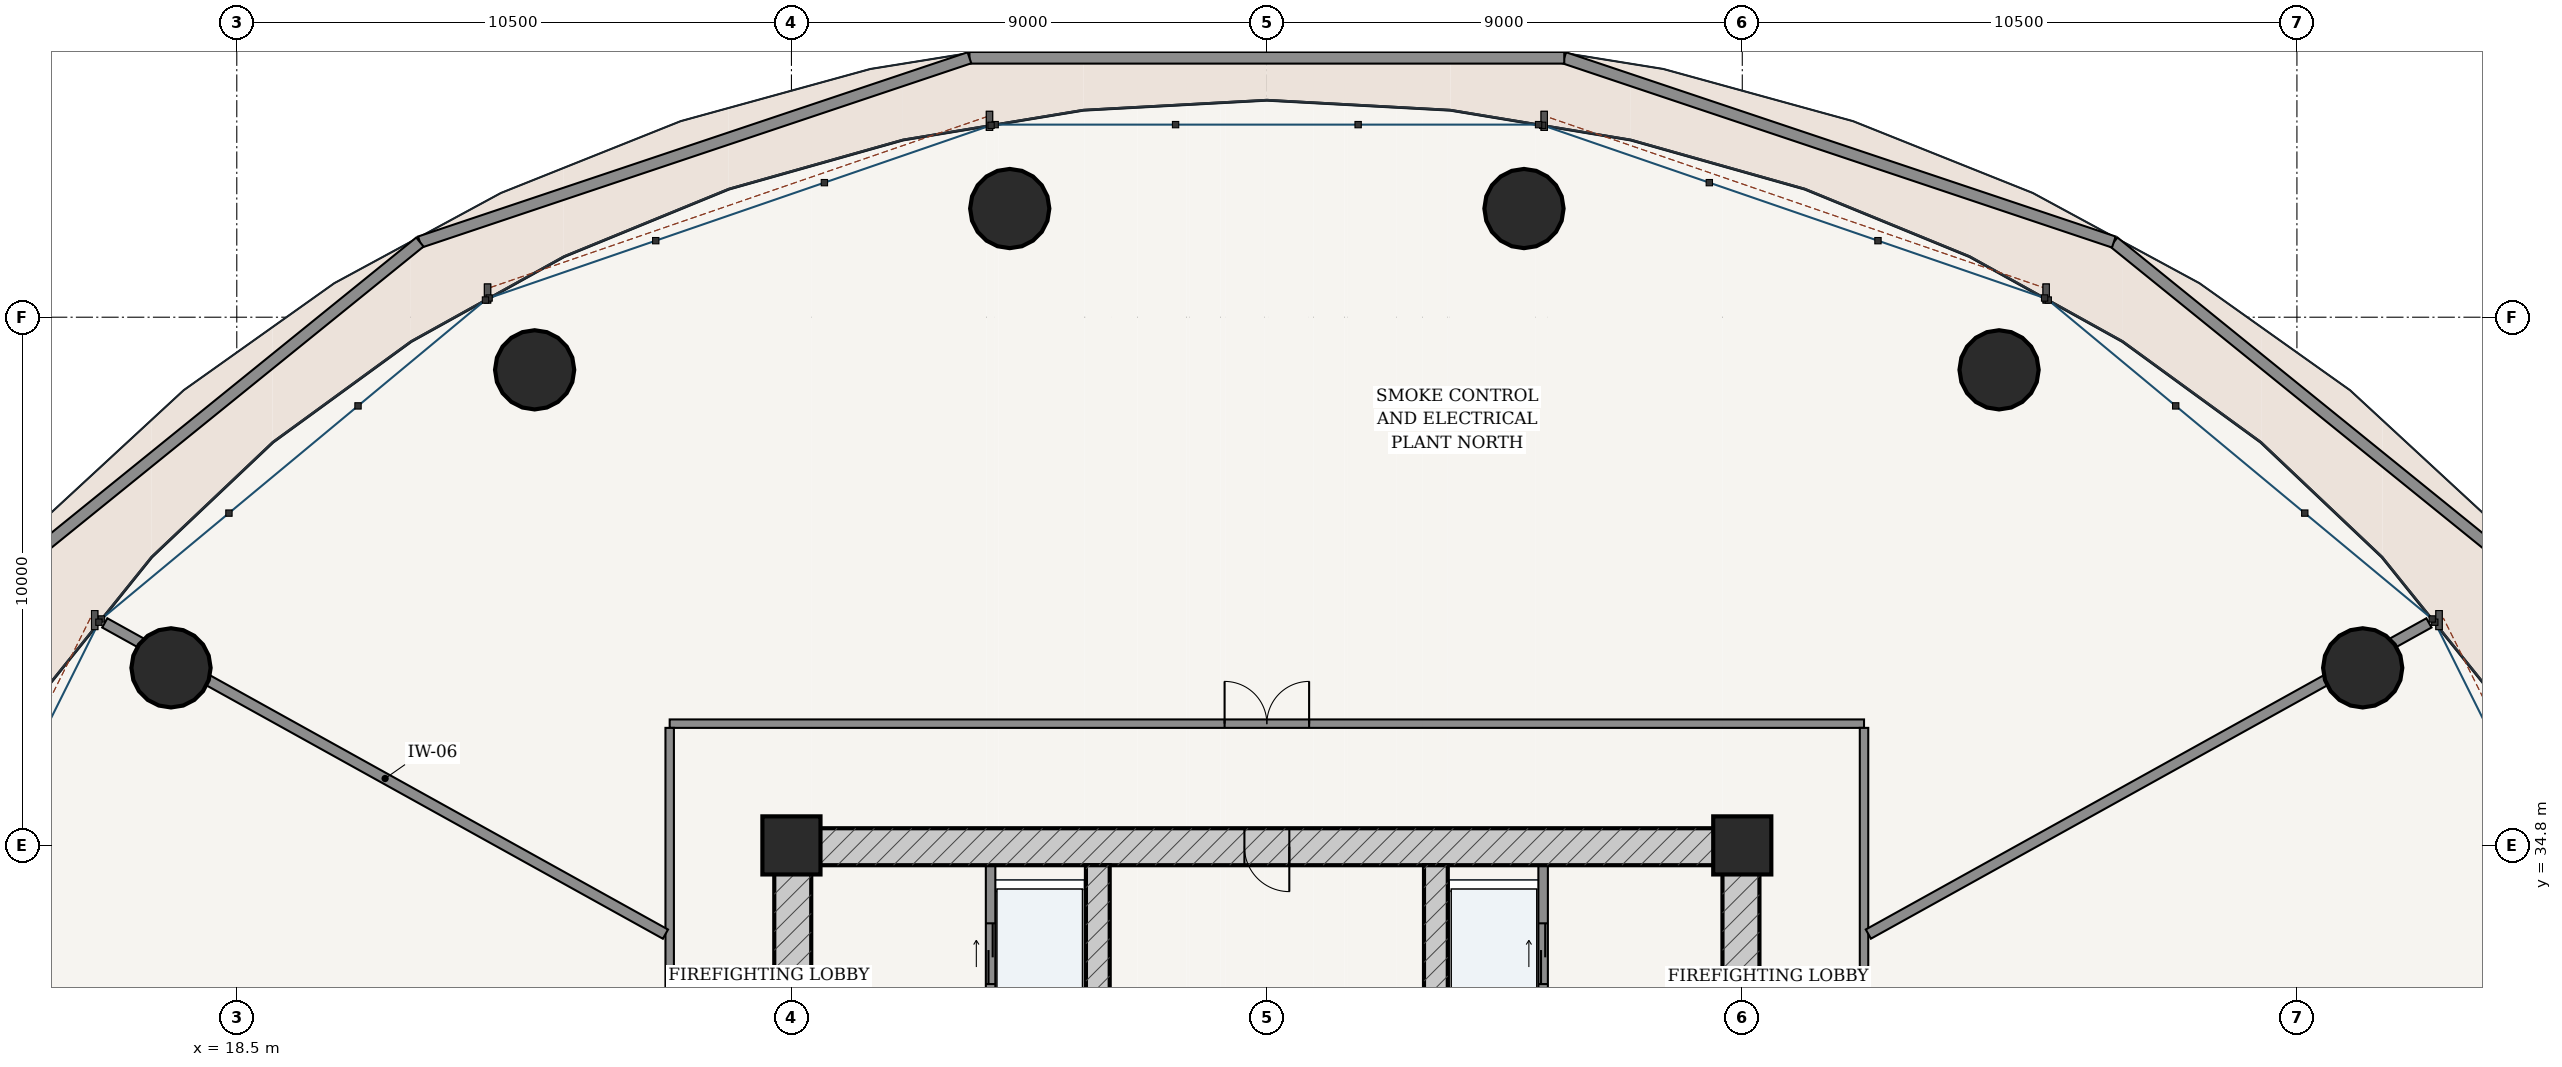
"""IFC4 building model, lengths in metres.
Left out: names, types, materials, properties, quantities, classifications, styles, units other than length and angle.
Written with IfcOpenShell. Run it as: python <this file> out.ifc"""

import sys

from ifc_helpers import new_model, si_unit, direction, frame, frame_2d, origin, origin_2d, place, context, subcontext, project, spatial, rectangle, hollow_circle, extrude, source, transform, mapped, element, fill, save


model = new_model("IFC4")
c1 = context("Model", 3, precision=1e-05, world=origin(), true_north=direction((-0.2419218956, 0.970295726276)))
c2 = subcontext(c1, "Body", "Model", "MODEL_VIEW")
j1 = project(units=[si_unit("LENGTHUNIT", "METRE"), si_unit("PLANEANGLEUNIT", "RADIAN")], contexts=[c1])
p1 = place(None, origin())
s1 = spatial("IfcSite", under=j1, at=p1, CompositionType="ELEMENT")
p2 = place(p1, origin())
s2 = spatial("IfcBuilding", under=s1, at=p2, CompositionType="ELEMENT")
p3 = place(p2, frame((0.0, 0.0, 74.4)))
s3 = spatial("IfcBuildingStorey", under=s2, at=p3, CompositionType="ELEMENT", Elevation=74.4)
for number, where, z_axis, x_axis in (
    (1, (47.0, 34.8, 0.0), (0.0, 0.0, 1.0), (1.0, 0.0, 0.0)),
    (2, (29.0, 34.8, 0.0), (0.0, 0.0, 1.0), (1.0, 0.0, 0.0)),
):
    element("IfcColumn", number, at=place(p3, frame(where, z_axis=z_axis, x_axis=x_axis)), inside=s3, PredefinedType="COLUMN", context=c2, shape_type="SweptSolid", body=[
        extrude(rectangle(XDim=1.1, YDim=1.1, at=origin_2d()), origin(), (0.0, 0.0, 1.0), 5.4),
    ])
p4 = place(p3, frame((28.675, 34.775, 0.0), z_axis=(0.0, 0.0, 1.0), x_axis=(1.0, 0.0, 0.0)))
e3 = element("IfcWall", 3, at=p4, inside=s3, PredefinedType="SHEAR", context=c2, shape_type="SweptSolid", body=[
    extrude(rectangle(XDim=18.65, YDim=0.7, at=frame_2d((9.325, 0.0))), origin(), (0.0, 0.0, 1.0), 5.125),
])
p5 = place(p4, frame((8.9, 0.0, 0.0)))
e4 = element("IfcOpeningElement", 4, at=p5, cuts=e3, PredefinedType="OPENING", context=c2, shape_type="SweptSolid", body=[
    extrude(rectangle(XDim=0.85, YDim=2.1, at=frame_2d((0.425, 1.05))), frame((0.0, 0.36, 0.0), z_axis=(0.0, -1.0, 0.0), x_axis=(1.0, 0.0, 0.0)), (0.0, 0.0, 1.0), 0.72),
])
p6 = place(p3, frame((29.025, 19.175, 0.0), z_axis=(0.0, 0.0, 1.0), x_axis=(0.0, 1.0, 0.0)))
e5 = element("IfcWall", 5, at=p6, inside=s3, PredefinedType="SHEAR", context=c2, shape_type="SweptSolid", body=[
    extrude(rectangle(XDim=15.25, YDim=0.7, at=frame_2d((7.625, 0.0))), origin(), (0.0, 0.0, 1.0), 5.125),
])
p7 = place(p6, frame((9.875, 0.0, 0.0)))
e6 = element("IfcOpeningElement", 6, at=p7, cuts=e5, PredefinedType="OPENING", context=c2, shape_type="SweptSolid", body=[
    extrude(rectangle(XDim=1.5, YDim=2.2, at=frame_2d((0.75, 1.1))), frame((0.0, 0.36, 0.0), z_axis=(0.0, -1.0, 0.0), x_axis=(1.0, 0.0, 0.0)), (0.0, 0.0, 1.0), 0.72),
])
p8 = place(p3, frame((46.975, 19.175, 0.0), z_axis=(0.0, 0.0, 1.0), x_axis=(0.0, 1.0, 0.0)))
e7 = element("IfcWall", 7, at=p8, inside=s3, PredefinedType="SHEAR", context=c2, shape_type="SweptSolid", body=[
    extrude(rectangle(XDim=15.25, YDim=0.7, at=frame_2d((7.625, 0.0))), origin(), (0.0, 0.0, 1.0), 5.125),
])
p9 = place(p8, frame((9.875, 0.0, 0.0)))
e8 = element("IfcOpeningElement", 8, at=p9, cuts=e7, PredefinedType="OPENING", context=c2, shape_type="SweptSolid", body=[
    extrude(rectangle(XDim=1.5, YDim=2.2, at=frame_2d((0.75, 1.1))), frame((0.0, 0.36, 0.0), z_axis=(0.0, -1.0, 0.0), x_axis=(1.0, 0.0, 0.0)), (0.0, 0.0, 1.0), 0.72),
])
p10 = place(p3, frame((34.8, 19.175, 0.0), z_axis=(0.0, 0.0, 1.0), x_axis=(0.0, 1.0, 0.0)))
e9 = element("IfcWall", 9, at=p10, inside=s3, PredefinedType="SHEAR", context=c2, shape_type="SweptSolid", body=[
    extrude(rectangle(XDim=15.25, YDim=0.45, at=frame_2d((7.625, 0.0))), origin(), (0.0, 0.0, 1.0), 5.125),
])
p11 = place(p10, frame((7.8, 0.0, 0.0)))
e10 = element("IfcOpeningElement", 10, at=p11, cuts=e9, PredefinedType="OPENING", context=c2, shape_type="SweptSolid", body=[
    extrude(rectangle(XDim=1.05, YDim=2.15, at=frame_2d((0.525, 1.075))), frame((0.0, 0.235, 0.0), z_axis=(0.0, -1.0, 0.0), x_axis=(1.0, 0.0, 0.0)), (0.0, 0.0, 1.0), 0.47),
])
p12 = place(p3, frame((41.2, 19.175, 0.0), z_axis=(0.0, 0.0, 1.0), x_axis=(0.0, 1.0, 0.0)))
e11 = element("IfcWall", 11, at=p12, inside=s3, PredefinedType="SHEAR", context=c2, shape_type="SweptSolid", body=[
    extrude(rectangle(XDim=15.25, YDim=0.45, at=frame_2d((7.625, 0.0))), origin(), (0.0, 0.0, 1.0), 5.125),
])
p13 = place(p12, frame((7.8, 0.0, 0.0)))
e12 = element("IfcOpeningElement", 12, at=p13, cuts=e11, PredefinedType="OPENING", context=c2, shape_type="SweptSolid", body=[
    extrude(rectangle(XDim=1.05, YDim=2.15, at=frame_2d((0.525, 1.075))), frame((0.0, 0.235, 0.0), z_axis=(0.0, -1.0, 0.0), x_axis=(1.0, 0.0, 0.0)), (0.0, 0.0, 1.0), 0.47),
])
for number, where, z_axis, x_axis in (
    (13, (58.745, 38.161, 0.0), (0.0, 0.0, 1.0), (1.0, 0.0, 0.0)),
    (14, (51.862, 43.803, 0.0), (0.0, 0.0, 1.0), (1.0, 0.0, 0.0)),
    (15, (42.867, 46.857, 0.0), (0.0, 0.0, 1.0), (1.0, 0.0, 0.0)),
    (16, (33.133, 46.857, 0.0), (0.0, 0.0, 1.0), (1.0, 0.0, 0.0)),
    (17, (24.138, 43.803, 0.0), (0.0, 0.0, 1.0), (1.0, 0.0, 0.0)),
    (18, (17.255, 38.161, 0.0), (0.0, 0.0, 1.0), (1.0, 0.0, 0.0)),
):
    element("IfcColumn", number, at=place(p3, frame(where, z_axis=z_axis, x_axis=x_axis)), inside=s3, PredefinedType="COLUMN", context=c2, shape_type="SweptSolid", body=[
        extrude(hollow_circle(Radius=0.75, WallThickness=0.045, at=origin_2d()), origin(), (0.0, 0.0, 1.0), 5.4),
    ])
p14 = place(p3, frame((61.996, 39.778, 0.0), z_axis=(0.0, 0.0, 1.0), x_axis=(-0.777277615045, 0.629157777628, 0.0)))
e19 = element("IfcWall", 19, at=p14, inside=s3, PredefinedType="PARAPET", context=c2, shape_type="SweptSolid", body=[
    extrude(rectangle(XDim=10.244, YDim=0.22, at=frame_2d((5.122, 0.0))), origin(), (0.0, 0.0, 1.0), 1.15),
])
p15 = place(p3, frame((54.034, 46.223, 0.0), z_axis=(0.0, 0.0, 1.0), x_axis=(-0.948127810737, 0.317889374636, 0.0)))
e20 = element("IfcWall", 20, at=p15, inside=s3, PredefinedType="PARAPET", context=c2, shape_type="SweptSolid", body=[
    extrude(rectangle(XDim=10.972, YDim=0.22, at=frame_2d((5.486, 0.0))), origin(), (0.0, 0.0, 1.0), 1.15),
])
p16 = place(p3, frame((43.63, 49.711, 0.0), z_axis=(0.0, 0.0, 1.0), x_axis=(-1.0, 0.0, 0.0)))
e21 = element("IfcWall", 21, at=p16, inside=s3, PredefinedType="PARAPET", context=c2, shape_type="SweptSolid", body=[
    extrude(rectangle(XDim=11.261, YDim=0.22, at=frame_2d((5.63, 0.0))), origin(), (0.0, 0.0, 1.0), 1.15),
])
p17 = place(p3, frame((32.37, 49.711, 0.0), z_axis=(0.0, 0.0, 1.0), x_axis=(-0.948127810737, -0.317889374636, 0.0)))
e22 = element("IfcWall", 22, at=p17, inside=s3, PredefinedType="PARAPET", context=c2, shape_type="SweptSolid", body=[
    extrude(rectangle(XDim=10.972, YDim=0.22, at=frame_2d((5.486, 0.0))), origin(), (0.0, 0.0, 1.0), 1.15),
])
p18 = place(p3, frame((21.966, 46.223, 0.0), z_axis=(0.0, 0.0, 1.0), x_axis=(-0.777277615045, -0.629157777628, 0.0)))
e23 = element("IfcWall", 23, at=p18, inside=s3, PredefinedType="PARAPET", context=c2, shape_type="SweptSolid", body=[
    extrude(rectangle(XDim=10.244, YDim=0.22, at=frame_2d((5.122, 0.0))), origin(), (0.0, 0.0, 1.0), 1.15),
])
p19 = place(p3, frame((32.77, 28.52, 0.0), z_axis=(0.0, 0.0, 1.0), x_axis=(0.0, 1.0, 0.0)))
e24 = element("IfcWall", 24, at=p19, inside=s3, PredefinedType="PARTITIONING", context=c2, shape_type="SweptSolid", body=[
    extrude(rectangle(XDim=5.905, YDim=0.18, at=frame_2d((2.953, 0.0))), origin(), (0.0, 0.0, 1.0), 5.125),
])
p20 = place(p19, frame((3.655, 0.0, 0.0)))
e25 = element("IfcOpeningElement", 25, at=p20, cuts=e24, PredefinedType="OPENING", context=c2, shape_type="SweptSolid", body=[
    extrude(rectangle(XDim=1.15, YDim=2.2, at=frame_2d((0.575, 1.1))), frame((0.0, 0.1, 0.0), z_axis=(0.0, -1.0, 0.0), x_axis=(1.0, 0.0, 0.0)), (0.0, 0.0, 1.0), 0.2),
])
p21 = place(p19, frame((0.73, 0.0, 0.0)))
e26 = element("IfcOpeningElement", 26, at=p21, cuts=e24, PredefinedType="OPENING", context=c2, shape_type="SweptSolid", body=[
    extrude(rectangle(XDim=1.2, YDim=2.25, at=frame_2d((0.6, 1.125))), frame((0.0, 0.1, 0.0), z_axis=(0.0, -1.0, 0.0), x_axis=(1.0, 0.0, 0.0)), (0.0, 0.0, 1.0), 0.2),
])
p22 = place(p3, frame((43.23, 28.52, 0.0), z_axis=(0.0, 0.0, 1.0), x_axis=(0.0, 1.0, 0.0)))
e27 = element("IfcWall", 27, at=p22, inside=s3, PredefinedType="PARTITIONING", context=c2, shape_type="SweptSolid", body=[
    extrude(rectangle(XDim=5.905, YDim=0.18, at=frame_2d((2.953, 0.0))), origin(), (0.0, 0.0, 1.0), 5.125),
])
p23 = place(p22, frame((0.905, 0.0, 0.0)))
e28 = element("IfcOpeningElement", 28, at=p23, cuts=e27, PredefinedType="OPENING", context=c2, shape_type="SweptSolid", body=[
    extrude(rectangle(XDim=0.85, YDim=2.1, at=frame_2d((0.425, 1.05))), frame((0.0, 0.1, 0.0), z_axis=(0.0, -1.0, 0.0), x_axis=(1.0, 0.0, 0.0)), (0.0, 0.0, 1.0), 0.2),
])
p24 = place(p22, frame((3.655, 0.0, 0.0)))
e29 = element("IfcOpeningElement", 29, at=p24, cuts=e27, PredefinedType="OPENING", context=c2, shape_type="SweptSolid", body=[
    extrude(rectangle(XDim=1.15, YDim=2.2, at=frame_2d((0.575, 1.1))), frame((0.0, 0.1, 0.0), z_axis=(0.0, -1.0, 0.0), x_axis=(1.0, 0.0, 0.0)), (0.0, 0.0, 1.0), 0.2),
])
p25 = place(p3, frame((26.695, 37.105, 0.0), z_axis=(0.0, 0.0, 1.0), x_axis=(1.0, 0.0, 0.0)))
e30 = element("IfcWall", 30, at=p25, inside=s3, PredefinedType="PARTITIONING", context=c2, shape_type="SweptSolid", body=[
    extrude(rectangle(XDim=22.61, YDim=0.16, at=frame_2d((11.305, 0.0))), origin(), (0.0, 0.0, 1.0), 4.567),
])
p26 = place(p25, frame((10.505, 0.0, 0.0)))
e31 = element("IfcOpeningElement", 31, at=p26, cuts=e30, PredefinedType="OPENING", context=c2, shape_type="SweptSolid", body=[
    extrude(rectangle(XDim=1.6, YDim=2.25, at=frame_2d((0.8, 1.125))), frame((0.0, 0.09, 0.0), z_axis=(0.0, -1.0, 0.0), x_axis=(1.0, 0.0, 0.0)), (0.0, 0.0, 1.0), 0.18),
])
p27 = place(p3, frame((26.695, 16.575, 0.0), z_axis=(0.0, 0.0, 1.0), x_axis=(0.0, 1.0, 0.0)))
e32 = element("IfcWall", 32, at=p27, inside=s3, PredefinedType="PARTITIONING", context=c2, shape_type="SweptSolid", body=[
    extrude(rectangle(XDim=20.45, YDim=0.16, at=frame_2d((10.225, 0.0))), origin(), (0.0, 0.0, 1.0), 4.567),
])
p28 = place(p27, frame((9.475, 0.0, 0.0)))
e33 = element("IfcOpeningElement", 33, at=p28, cuts=e32, PredefinedType="OPENING", context=c2, shape_type="SweptSolid", body=[
    extrude(rectangle(XDim=1.5, YDim=2.2, at=frame_2d((0.75, 1.1))), frame((0.0, 0.09, 0.0), z_axis=(0.0, -1.0, 0.0), x_axis=(1.0, 0.0, 0.0)), (0.0, 0.0, 1.0), 0.18),
])
p29 = place(p3, frame((49.305, 16.575, 0.0), z_axis=(0.0, 0.0, 1.0), x_axis=(0.0, 1.0, 0.0)))
e34 = element("IfcWall", 34, at=p29, inside=s3, PredefinedType="PARTITIONING", context=c2, shape_type="SweptSolid", body=[
    extrude(rectangle(XDim=20.45, YDim=0.16, at=frame_2d((10.225, 0.0))), origin(), (0.0, 0.0, 1.0), 4.567),
])
p30 = place(p29, frame((9.425, 0.0, 0.0)))
e35 = element("IfcOpeningElement", 35, at=p30, cuts=e34, PredefinedType="OPENING", context=c2, shape_type="SweptSolid", body=[
    extrude(rectangle(XDim=1.6, YDim=2.25, at=frame_2d((0.8, 1.125))), frame((0.0, 0.09, 0.0), z_axis=(0.0, -1.0, 0.0), x_axis=(1.0, 0.0, 0.0)), (0.0, 0.0, 1.0), 0.18),
])
p31 = place(p3, frame((26.615, 33.12, 0.0), z_axis=(0.0, 0.0, 1.0), x_axis=(-0.87431374927, 0.485361172569, 0.0)))
e36 = element("IfcWall", 36, at=p31, inside=s3, PredefinedType="PARTITIONING", context=c2, shape_type="SweptSolid", body=[
    extrude(rectangle(XDim=12.14, YDim=0.2, at=frame_2d((6.07, 0.0))), origin(), (0.0, 0.0, 1.0), 4.567),
])
p32 = place(p3, frame((49.387, 33.121, 0.0), z_axis=(0.0, 0.0, 1.0), x_axis=(0.874314722833, 0.48535941882, 0.0)))
e37 = element("IfcWall", 37, at=p32, inside=s3, PredefinedType="PARTITIONING", context=c2, shape_type="SweptSolid", body=[
    extrude(rectangle(XDim=12.138, YDim=0.2, at=frame_2d((6.069, 0.0))), origin(), (0.0, 0.0, 1.0), 4.567),
])
m1 = source(origin(), c2, "Body", "SweptSolid", [
    extrude(rectangle(XDim=0.85, YDim=2.1, at=frame_2d((0.425, 1.05))), frame((0.0, 0.025, 0.0), z_axis=(0.0, -1.0, 0.0), x_axis=(1.0, 0.0, 0.0)), (0.0, 0.0, 1.0), 0.05),
])
p33 = place(p5, frame((0.85, 0.0, 0.0), z_axis=(0.0, 0.0, 1.0), x_axis=(-1.0, 0.0, 0.0)))
e38 = element("IfcDoor", 38, at=p33, inside=s3, OperationType="SINGLE_SWING_LEFT", PredefinedType="DOOR", context=c2, shape_type="MappedRepresentation", body=[
    mapped(m1, transform((0.0, 0.0, 0.0), scale=1.0)),
])
fill(e4, e38)
m2 = source(origin(), c2, "Body", "SweptSolid", [
    extrude(rectangle(XDim=1.15, YDim=2.2, at=frame_2d((0.575, 1.1))), frame((0.0, 0.025, 0.0), z_axis=(0.0, -1.0, 0.0), x_axis=(1.0, 0.0, 0.0)), (0.0, 0.0, 1.0), 0.05),
])
p34 = place(p20, origin())
e39 = element("IfcDoor", 39, at=p34, inside=s3, OperationType="DOUBLE_DOOR_SLIDING", PredefinedType="DOOR", context=c2, shape_type="MappedRepresentation", body=[
    mapped(m2, transform((0.0, 0.0, 0.0), scale=1.0)),
])
fill(e25, e39)
p35 = place(p24, origin())
e40 = element("IfcDoor", 40, at=p35, inside=s3, OperationType="DOUBLE_DOOR_SLIDING", PredefinedType="DOOR", context=c2, shape_type="MappedRepresentation", body=[
    mapped(m2, transform((0.0, 0.0, 0.0), scale=1.0)),
])
fill(e29, e40)
m3 = source(origin(), c2, "Body", "SweptSolid", [
    extrude(rectangle(XDim=1.6, YDim=2.25, at=frame_2d((0.8, 1.125))), frame((0.0, 0.025, 0.0), z_axis=(0.0, -1.0, 0.0), x_axis=(1.0, 0.0, 0.0)), (0.0, 0.0, 1.0), 0.05),
])
p36 = place(p26, origin())
e41 = element("IfcDoor", 41, at=p36, inside=s3, OperationType="DOUBLE_DOOR_SINGLE_SWING", PredefinedType="DOOR", context=c2, shape_type="MappedRepresentation", body=[
    mapped(m3, transform((0.0, 0.0, 0.0), scale=1.0)),
])
fill(e31, e41)
save(model, sys.argv[1])
